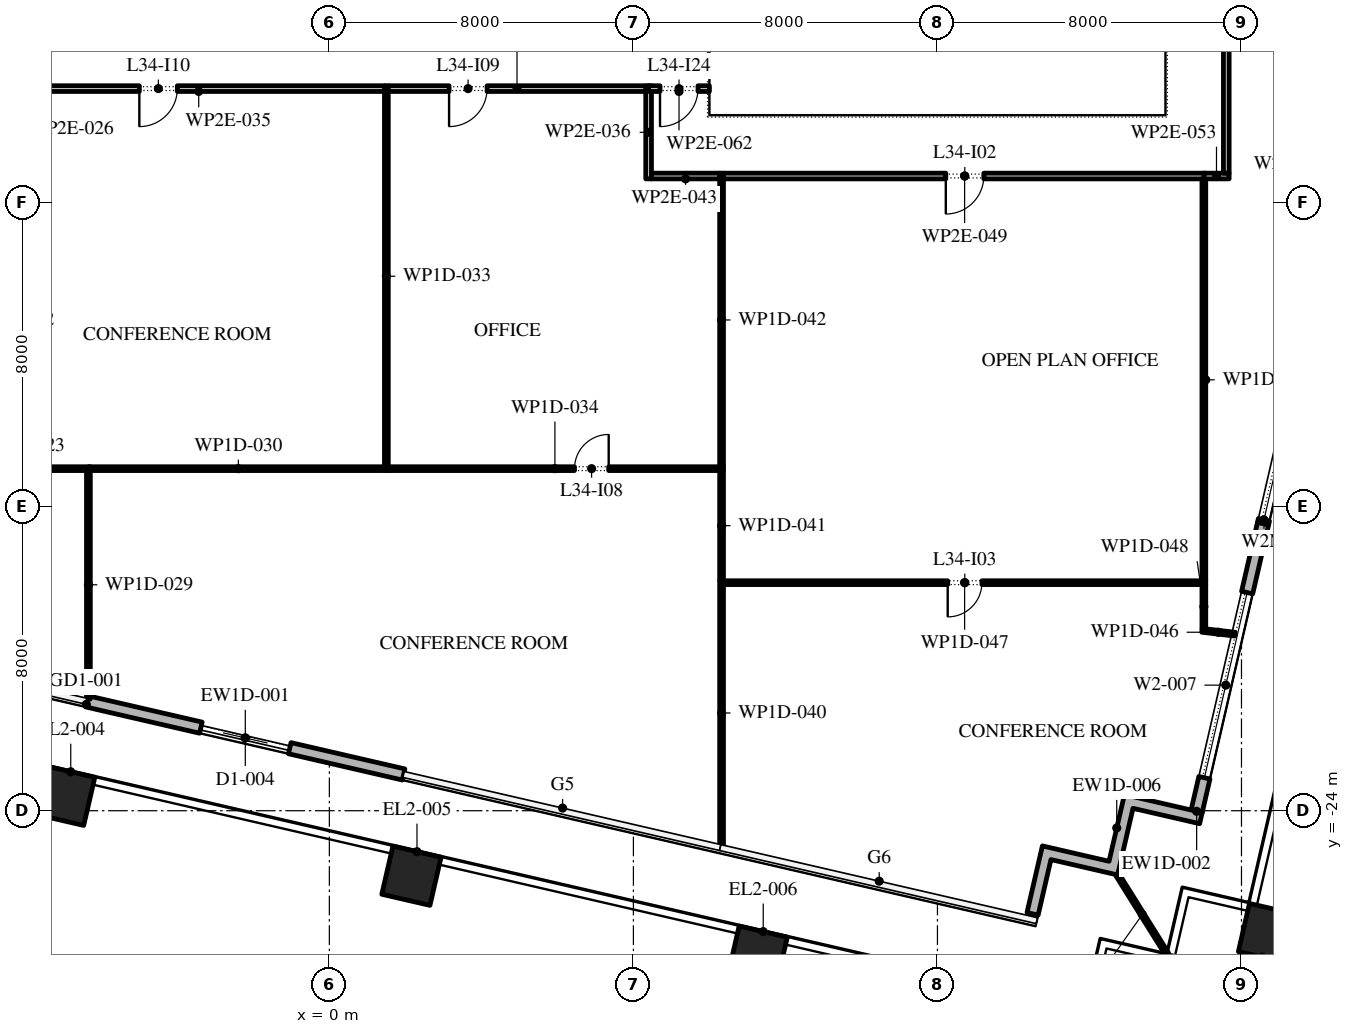
"""IFC4 building model, lengths in metres.
Left out: names, types, materials, properties, quantities, classifications, styles, units other than length and angle.
Written with IfcOpenShell. Run it as: python <this file> out.ifc"""

import sys

from ifc_helpers import new_model, si_unit, direction, frame, frame_2d, origin, origin_2d, place, context, subcontext, project, spatial, polyline, rectangle, outline, extrude, element, fill, save


model = new_model("IFC4")
c1 = context("Model", 3, precision=1e-05, world=origin(), true_north=direction((0.0, 1.0)))
c2 = subcontext(c1, "Body", "Model", "MODEL_VIEW")
j1 = project(units=[si_unit("LENGTHUNIT", "METRE"), si_unit("PLANEANGLEUNIT", "RADIAN")], contexts=[c1])
p1 = place(None, origin())
s1 = spatial("IfcSite", under=j1, at=p1, CompositionType="ELEMENT")
p2 = place(p1, origin())
s2 = spatial("IfcBuilding", under=s1, at=p2, CompositionType="ELEMENT")
p3 = place(p2, frame((0.0, 0.0, 156.0)))
s3 = spatial("IfcBuildingStorey", under=s2, at=p3, CompositionType="ELEMENT", Elevation=156.0)
for number, where, z_axis, x_axis in (
    (1, (-6.951, -23.608, 0.0), (0.0, 0.0, 1.0), (0.974, -0.225, 0.0)),
    (2, (2.159, -25.711, 0.0), (0.0, 0.0, 1.0), (0.974, -0.225, 0.0)),
    (3, (11.27, -27.815, 0.0), (0.0, 0.0, 1.0), (0.974, -0.225, 0.0)),
    (4, (24.698, -27.22, 0.0), (0.0, 0.0, 1.0), (0.974, -0.225, 0.0)),
    (5, (22.539, -28.569, 0.0), (0.0, 0.0, 1.0), (0.974, -0.225, 0.0)),
):
    element("IfcColumn", number, at=place(p3, frame(where, z_axis=z_axis, x_axis=x_axis)), inside=s3, PredefinedType="COLUMN", context=c2, shape_type="SweptSolid", body=[
        extrude(rectangle(XDim=1.3, YDim=1.3, at=origin_2d()), origin(), (0.0, 0.0, 1.0), 4.2),
    ])
p4 = place(p3, frame((-6.377, -21.123, 0.0), z_axis=(0.0, 0.0, 1.0), x_axis=(0.974370979495, -0.224947092265, 0.0)))
e6 = element("IfcWall", 6, at=p4, inside=s3, PredefinedType="STANDARD", context=c2, shape_type="SweptSolid", body=[
    extrude(rectangle(XDim=8.55, YDim=0.3, at=frame_2d((4.275, 0.0))), origin(), (0.0, 0.0, 1.0), 3.9),
])
p5 = place(p4, frame((3.075, 0.0, 0.0)))
e7 = element("IfcOpeningElement", 7, at=p5, cuts=e6, PredefinedType="OPENING", context=c2, shape_type="SweptSolid", body=[
    extrude(rectangle(XDim=2.4, YDim=3.5, at=frame_2d((1.2, 1.75))), frame((0.0, 0.16, 0.0), z_axis=(0.0, -1.0, 0.0), x_axis=(1.0, 0.0, 0.0)), (0.0, 0.0, 1.0), 0.32),
])
p6 = place(p3, frame((22.82, -24.016, 0.0), z_axis=(0.0, 0.0, 1.0), x_axis=(0.224962751334, 0.974367364248, 0.0)))
e8 = element("IfcWall", 8, at=p6, inside=s3, PredefinedType="STANDARD", context=c2, shape_type="SweptSolid", body=[
    extrude(rectangle(XDim=7.771, YDim=0.3, at=frame_2d((3.886, 0.0))), origin(), (0.0, 0.0, 1.0), 3.9),
])
p7 = place(p6, frame((0.907, 0.0, 0.45)))
e9 = element("IfcOpeningElement", 9, at=p7, cuts=e8, PredefinedType="OPENING", context=c2, shape_type="SweptSolid", body=[
    extrude(rectangle(XDim=5.0, YDim=3.25, at=frame_2d((2.5, 1.625))), frame((0.0, 0.16, 0.0), z_axis=(0.0, -1.0, 0.0), x_axis=(1.0, 0.0, 0.0)), (0.0, 0.0, 1.0), 0.32),
])
p8 = place(p3, origin())
e10 = element("IfcWall", 10, at=p8, inside=s3, PredefinedType="STANDARD", context=c2, shape_type="SweptSolid", body=[
    extrude(outline(polyline([(20.515, -25.331), (20.92, -23.577), (22.967, -24.049), (22.899, -24.342), (21.145, -23.937), (20.74, -25.691), (18.986, -25.286), (18.649, -26.747), (18.357, -26.68), (18.762, -24.926), (20.515, -25.331)])), origin(), (0.0, 0.0, 1.0), 3.9),
])
p9 = place(p3, frame((20.74, -25.691, -0.05), z_axis=(0.0, 0.0, 1.0), x_axis=(0.529972121605, -0.848015064914, 0.0)))
e11 = element("IfcWall", 11, at=p9, inside=s3, PredefinedType="STANDARD", context=c2, shape_type="SweptSolid", body=[
    extrude(rectangle(XDim=2.455, YDim=0.1, at=frame_2d((1.228, 0.0))), origin(), (0.0, 0.0, 1.0), 3.95),
])
p10 = place(p3, frame((-9.95, -15.0, 0.0), z_axis=(0.0, 0.0, 1.0), x_axis=(1.0, 0.0, 0.0)))
e12 = element("IfcWall", 12, at=p10, inside=s3, PredefinedType="PARTITIONING", context=c2, shape_type="SweptSolid", body=[
    extrude(rectangle(XDim=3.66, YDim=0.1, at=frame_2d((1.83, 0.0))), origin(), (0.0, 0.0, 1.0), 3.9),
])
p11 = place(p3, frame((-6.34, -15.05, 0.0), z_axis=(0.0, 0.0, 1.0), x_axis=(0.0, -1.0, 0.0)))
e13 = element("IfcWall", 13, at=p11, inside=s3, PredefinedType="PARTITIONING", context=c2, shape_type="SweptSolid", body=[
    extrude(rectangle(XDim=6.011, YDim=0.1, at=frame_2d((3.005, 0.0))), origin(), (0.0, 0.0, 1.0), 3.9),
])
p12 = place(p3, frame((-6.34, -15.0, 0.0), z_axis=(0.0, 0.0, 1.0), x_axis=(1.0, 0.0, 0.0)))
e14 = element("IfcWall", 14, at=p12, inside=s3, PredefinedType="PARTITIONING", context=c2, shape_type="SweptSolid", body=[
    extrude(rectangle(XDim=7.89, YDim=0.1, at=frame_2d((3.945, 0.0))), origin(), (0.0, 0.0, 1.0), 3.9),
])
p13 = place(p3, frame((1.5, -14.95, 0.0), z_axis=(0.0, 0.0, 1.0), x_axis=(0.0, 1.0, 0.0)))
e15 = element("IfcWall", 15, at=p13, inside=s3, PredefinedType="PARTITIONING", context=c2, shape_type="SweptSolid", body=[
    extrude(rectangle(XDim=10.025, YDim=0.1, at=frame_2d((5.012, 0.0))), origin(), (0.0, 0.0, 1.0), 3.9),
])
p14 = place(p3, frame((1.5, -15.0, 0.0), z_axis=(0.0, 0.0, 1.0), x_axis=(1.0, 0.0, 0.0)))
e16 = element("IfcWall", 16, at=p14, inside=s3, PredefinedType="PARTITIONING", context=c2, shape_type="SweptSolid", body=[
    extrude(rectangle(XDim=8.87, YDim=0.1, at=frame_2d((4.435, 0.0))), origin(), (0.0, 0.0, 1.0), 3.9),
])
p15 = place(p14, frame((4.95, 0.0, 0.0)))
e17 = element("IfcOpeningElement", 17, at=p15, cuts=e16, PredefinedType="OPENING", context=c2, shape_type="SweptSolid", body=[
    extrude(rectangle(XDim=0.9, YDim=2.1, at=frame_2d((0.45, 1.05))), frame((0.0, 0.06, 0.0), z_axis=(0.0, -1.0, 0.0), x_axis=(1.0, 0.0, 0.0)), (0.0, 0.0, 1.0), 0.12),
])
p16 = place(p3, frame((1.45, -5.0, 0.0), z_axis=(0.0, 0.0, 1.0), x_axis=(-1.0, 0.0, 0.0)))
e18 = element("IfcWall", 18, at=p16, inside=s3, PredefinedType="PARTITIONING", context=c2, shape_type="SweptSolid", body=[
    extrude(rectangle(XDim=9.775, YDim=0.15, at=frame_2d((4.887, 0.0))), origin(), (0.0, 0.0, 1.0), 3.9),
])
p17 = place(p16, frame((5.45, 0.0, 0.0)))
e19 = element("IfcOpeningElement", 19, at=p17, cuts=e18, PredefinedType="OPENING", context=c2, shape_type="SweptSolid", body=[
    extrude(rectangle(XDim=1.0, YDim=2.1, at=frame_2d((0.5, 1.05))), frame((0.0, 0.085, 0.0), z_axis=(0.0, -1.0, 0.0), x_axis=(1.0, 0.0, 0.0)), (0.0, 0.0, 1.0), 0.17),
])
p18 = place(p3, frame((8.4, -7.375, 0.0), z_axis=(0.0, 0.0, 1.0), x_axis=(0.0, 1.0, 0.0)))
e20 = element("IfcWall", 20, at=p18, inside=s3, PredefinedType="PARTITIONING", context=c2, shape_type="SweptSolid", body=[
    extrude(rectangle(XDim=2.45, YDim=0.15, at=frame_2d((1.225, 0.0))), origin(), (0.0, 0.0, 1.0), 3.9),
])
p19 = place(p3, frame((8.325, -5.0, 0.0), z_axis=(0.0, 0.0, 1.0), x_axis=(-1.0, 0.0, 0.0)))
e21 = element("IfcWall", 21, at=p19, inside=s3, PredefinedType="PARTITIONING", context=c2, shape_type="SweptSolid", body=[
    extrude(rectangle(XDim=6.775, YDim=0.15, at=frame_2d((3.387, 0.0))), origin(), (0.0, 0.0, 1.0), 3.9),
])
p20 = place(p19, frame((4.175, 0.0, 0.0)))
e22 = element("IfcOpeningElement", 22, at=p20, cuts=e21, PredefinedType="OPENING", context=c2, shape_type="SweptSolid", body=[
    extrude(rectangle(XDim=1.0, YDim=2.1, at=frame_2d((0.5, 1.05))), frame((0.0, 0.085, 0.0), z_axis=(0.0, -1.0, 0.0), x_axis=(1.0, 0.0, 0.0)), (0.0, 0.0, 1.0), 0.17),
])
p21 = place(p3, frame((10.32, -24.907, 0.0), z_axis=(0.0, 0.0, 1.0), x_axis=(0.0, 1.0, 0.0)))
e23 = element("IfcWall", 23, at=p21, inside=s3, PredefinedType="PARTITIONING", context=c2, shape_type="SweptSolid", body=[
    extrude(rectangle(XDim=6.957, YDim=0.1, at=frame_2d((3.479, 0.0))), origin(), (0.0, 0.0, 1.0), 3.9),
])
p22 = place(p3, frame((10.32, -17.95, 0.0), z_axis=(0.0, 0.0, 1.0), x_axis=(0.0, 1.0, 0.0)))
e24 = element("IfcWall", 24, at=p22, inside=s3, PredefinedType="PARTITIONING", context=c2, shape_type="SweptSolid", body=[
    extrude(rectangle(XDim=2.9, YDim=0.1, at=frame_2d((1.45, 0.0))), origin(), (0.0, 0.0, 1.0), 3.9),
])
p23 = place(p3, frame((10.32, -14.95, 0.0), z_axis=(0.0, 0.0, 1.0), x_axis=(0.0, 1.0, 0.0)))
e25 = element("IfcWall", 25, at=p23, inside=s3, PredefinedType="PARTITIONING", context=c2, shape_type="SweptSolid", body=[
    extrude(rectangle(XDim=7.725, YDim=0.1, at=frame_2d((3.862, 0.0))), origin(), (0.0, 0.0, 1.0), 3.9),
])
p24 = place(p3, frame((10.27, -7.3, 0.0), z_axis=(0.0, 0.0, 1.0), x_axis=(-1.0, 0.0, 0.0)))
e26 = element("IfcWall", 26, at=p24, inside=s3, PredefinedType="PARTITIONING", context=c2, shape_type="SweptSolid", body=[
    extrude(rectangle(XDim=1.795, YDim=0.15, at=frame_2d((0.897, 0.0))), origin(), (0.0, 0.0, 1.0), 3.9),
])
p25 = place(p3, frame((22.96, -19.254, 0.0), z_axis=(0.0, 0.0, 1.0), x_axis=(0.993370815498, -0.114954003487, 0.0)))
e27 = element("IfcWall", 27, at=p25, inside=s3, PredefinedType="PARTITIONING", context=c2, shape_type="SweptSolid", body=[
    extrude(rectangle(XDim=0.871, YDim=0.1, at=frame_2d((0.436, 0.0))), origin(), (0.0, 0.0, 1.0), 3.9),
])
p26 = place(p3, frame((23.06, -18.0, 0.0), z_axis=(0.0, 0.0, 1.0), x_axis=(-1.0, 0.0, 0.0)))
e28 = element("IfcWall", 28, at=p26, inside=s3, PredefinedType="PARTITIONING", context=c2, shape_type="SweptSolid", body=[
    extrude(rectangle(XDim=12.69, YDim=0.1, at=frame_2d((6.345, 0.0))), origin(), (0.0, 0.0, 1.0), 3.9),
])
p27 = place(p26, frame((5.89, 0.0, 0.0)))
e29 = element("IfcOpeningElement", 29, at=p27, cuts=e28, PredefinedType="OPENING", context=c2, shape_type="SweptSolid", body=[
    extrude(rectangle(XDim=0.9, YDim=2.1, at=frame_2d((0.45, 1.05))), frame((0.0, 0.06, 0.0), z_axis=(0.0, -1.0, 0.0), x_axis=(1.0, 0.0, 0.0)), (0.0, 0.0, 1.0), 0.12),
])
p28 = place(p3, frame((23.01, -18.05, 0.0), z_axis=(0.0, 0.0, 1.0), x_axis=(0.0, -1.0, 0.0)))
e30 = element("IfcWall", 30, at=p28, inside=s3, PredefinedType="PARTITIONING", context=c2, shape_type="SweptSolid", body=[
    extrude(rectangle(XDim=1.16, YDim=0.1, at=frame_2d((0.58, 0.0))), origin(), (0.0, 0.0, 1.0), 3.9),
])
p29 = place(p3, frame((23.06, -7.3, 0.0), z_axis=(0.0, 0.0, 1.0), x_axis=(-1.0, 0.0, 0.0)))
e31 = element("IfcWall", 31, at=p29, inside=s3, PredefinedType="PARTITIONING", context=c2, shape_type="SweptSolid", body=[
    extrude(rectangle(XDim=12.69, YDim=0.15, at=frame_2d((6.345, 0.0))), origin(), (0.0, 0.0, 1.0), 3.9),
])
p30 = place(p29, frame((5.84, 0.0, 0.0)))
e32 = element("IfcOpeningElement", 32, at=p30, cuts=e31, PredefinedType="OPENING", context=c2, shape_type="SweptSolid", body=[
    extrude(rectangle(XDim=1.0, YDim=2.1, at=frame_2d((0.5, 1.05))), frame((0.0, 0.085, 0.0), z_axis=(0.0, -1.0, 0.0), x_axis=(1.0, 0.0, 0.0)), (0.0, 0.0, 1.0), 0.17),
])
p31 = place(p3, frame((23.01, -7.375, 0.0), z_axis=(0.0, 0.0, 1.0), x_axis=(0.0, -1.0, 0.0)))
e33 = element("IfcWall", 33, at=p31, inside=s3, PredefinedType="PARTITIONING", context=c2, shape_type="SweptSolid", body=[
    extrude(rectangle(XDim=10.575, YDim=0.1, at=frame_2d((5.288, 0.0))), origin(), (0.0, 0.0, 1.0), 3.9),
])
p32 = place(p3, frame((23.675, -7.3, 0.0), z_axis=(0.0, 0.0, 1.0), x_axis=(-1.0, 0.0, 0.0)))
e34 = element("IfcWall", 34, at=p32, inside=s3, PredefinedType="PARTITIONING", context=c2, shape_type="SweptSolid", body=[
    extrude(rectangle(XDim=0.665, YDim=0.15, at=frame_2d((0.333, 0.0))), origin(), (0.0, 0.0, 1.0), 3.9),
])
p33 = place(p3, frame((23.6, 10.44, 0.0), z_axis=(0.0, 0.0, 1.0), x_axis=(0.0, -1.0, 0.0)))
e35 = element("IfcWall", 35, at=p33, inside=s3, PredefinedType="PARTITIONING", context=c2, shape_type="SweptSolid", body=[
    extrude(rectangle(XDim=17.665, YDim=0.15, at=frame_2d((8.833, 0.0))), origin(), (0.0, 0.0, 1.0), 3.9),
])
p34 = place(p33, frame((6.59, 0.0, 0.0)))
e36 = element("IfcOpeningElement", 36, at=p34, cuts=e35, PredefinedType="OPENING", context=c2, shape_type="SweptSolid", body=[
    extrude(rectangle(XDim=1.0, YDim=2.1, at=frame_2d((0.5, 1.05))), frame((0.0, 0.085, 0.0), z_axis=(0.0, -1.0, 0.0), x_axis=(1.0, 0.0, 0.0)), (0.0, 0.0, 1.0), 0.17),
])
p35 = place(p3, frame((10.0, -5.0, 0.0), z_axis=(0.0, 0.0, 1.0), x_axis=(-1.0, 0.0, 0.0)))
e37 = element("IfcWall", 37, at=p35, inside=s3, PredefinedType="PARTITIONING", context=c2, shape_type="SweptSolid", body=[
    extrude(rectangle(XDim=1.6, YDim=0.15, at=frame_2d((0.8, 0.0))), origin(), (0.0, 0.0, 1.0), 3.9),
])
p36 = place(p35, frame((0.3, 0.0, 0.0)))
e38 = element("IfcOpeningElement", 38, at=p36, cuts=e37, PredefinedType="OPENING", context=c2, shape_type="SweptSolid", body=[
    extrude(rectangle(XDim=1.0, YDim=2.1, at=frame_2d((0.5, 1.05))), frame((0.0, 0.085, 0.0), z_axis=(0.0, -1.0, 0.0), x_axis=(1.0, 0.0, 0.0)), (0.0, 0.0, 1.0), 0.17),
])
p37 = place(p3, frame((24.569, -16.443, 0.0), z_axis=(0.0, 0.0, 1.0), x_axis=(0.224941801871, 0.974372200841, 0.0)))
e39 = element("IfcWall", 39, at=p37, inside=s3, PredefinedType="STANDARD", context=c2, shape_type="SweptSolid", body=[
    extrude(rectangle(XDim=5.2, YDim=0.3, at=frame_2d((2.6, 0.0))), origin(), (0.0, 0.0, 1.0), 2.93),
])
p38 = place(p37, frame((0.1, 0.0, 0.45)))
e40 = element("IfcOpeningElement", 40, at=p38, cuts=e39, PredefinedType="OPENING", context=c2, shape_type="SweptSolid", body=[
    extrude(rectangle(XDim=5.0, YDim=2.35, at=frame_2d((2.5, 1.175))), frame((0.0, 0.16, 0.0), z_axis=(0.0, -1.0, 0.0), x_axis=(1.0, 0.0, 0.0)), (0.0, 0.0, 1.0), 0.32),
])
p39 = place(p5, origin())
e41 = element("IfcDoor", 41, at=p39, inside=s3, OperationType="DOUBLE_DOOR_SLIDING", PredefinedType="DOOR", context=c2, shape_type="SweptSolid", body=[
    extrude(rectangle(XDim=2.4, YDim=3.5, at=frame_2d((1.2, 1.75))), frame((0.0, 0.025, 0.0), z_axis=(0.0, -1.0, 0.0), x_axis=(1.0, 0.0, 0.0)), (0.0, 0.0, 1.0), 0.05),
])
fill(e7, e41)
p40 = place(p7, origin())
e42 = element("IfcWindow", 42, at=p40, inside=s3, PartitioningType="DOUBLE_PANEL_VERTICAL", PredefinedType="WINDOW", context=c2, shape_type="SweptSolid", body=[
    extrude(rectangle(XDim=5.0, YDim=3.25, at=frame_2d((2.5, 1.625))), frame((0.0, 0.03, 0.0), z_axis=(0.0, -1.0, 0.0), x_axis=(1.0, 0.0, 0.0)), (0.0, 0.0, 1.0), 0.06),
])
fill(e9, e42)
p41 = place(p38, origin())
e43 = element("IfcWindow", 43, at=p41, inside=s3, PartitioningType="DOUBLE_PANEL_VERTICAL", PredefinedType="WINDOW", context=c2, shape_type="SweptSolid", body=[
    extrude(rectangle(XDim=5.0, YDim=2.35, at=frame_2d((2.5, 1.175))), frame((0.0, 0.03, 0.0), z_axis=(0.0, -1.0, 0.0), x_axis=(1.0, 0.0, 0.0)), (0.0, 0.0, 1.0), 0.06),
])
fill(e40, e43)
p42 = place(p30, origin())
e44 = element("IfcDoor", 44, at=p42, inside=s3, OperationType="SINGLE_SWING_LEFT", PredefinedType="DOOR", context=c2, shape_type="SweptSolid", body=[
    extrude(rectangle(XDim=1.0, YDim=2.1, at=frame_2d((0.5, 1.05))), frame((0.0, 0.025, 0.0), z_axis=(0.0, -1.0, 0.0), x_axis=(1.0, 0.0, 0.0)), (0.0, 0.0, 1.0), 0.05),
])
fill(e32, e44)
p43 = place(p27, origin())
e45 = element("IfcDoor", 45, at=p43, inside=s3, OperationType="SINGLE_SWING_LEFT", PredefinedType="DOOR", context=c2, shape_type="SweptSolid", body=[
    extrude(rectangle(XDim=0.9, YDim=2.1, at=frame_2d((0.45, 1.05))), frame((0.0, 0.025, 0.0), z_axis=(0.0, -1.0, 0.0), x_axis=(1.0, 0.0, 0.0)), (0.0, 0.0, 1.0), 0.05),
])
fill(e29, e45)
p44 = place(p15, origin())
e46 = element("IfcDoor", 46, at=p44, inside=s3, OperationType="SINGLE_SWING_LEFT", PredefinedType="DOOR", context=c2, shape_type="SweptSolid", body=[
    extrude(rectangle(XDim=0.9, YDim=2.1, at=frame_2d((0.45, 1.05))), frame((0.0, 0.025, 0.0), z_axis=(0.0, -1.0, 0.0), x_axis=(1.0, 0.0, 0.0)), (0.0, 0.0, 1.0), 0.05),
])
fill(e17, e46)
p45 = place(p20, origin())
e47 = element("IfcDoor", 47, at=p45, inside=s3, OperationType="SINGLE_SWING_LEFT", PredefinedType="DOOR", context=c2, shape_type="SweptSolid", body=[
    extrude(rectangle(XDim=1.0, YDim=2.1, at=frame_2d((0.5, 1.05))), frame((0.0, 0.025, 0.0), z_axis=(0.0, -1.0, 0.0), x_axis=(1.0, 0.0, 0.0)), (0.0, 0.0, 1.0), 0.05),
])
fill(e22, e47)
p46 = place(p17, origin())
e48 = element("IfcDoor", 48, at=p46, inside=s3, OperationType="SINGLE_SWING_LEFT", PredefinedType="DOOR", context=c2, shape_type="SweptSolid", body=[
    extrude(rectangle(XDim=1.0, YDim=2.1, at=frame_2d((0.5, 1.05))), frame((0.0, 0.025, 0.0), z_axis=(0.0, -1.0, 0.0), x_axis=(1.0, 0.0, 0.0)), (0.0, 0.0, 1.0), 0.05),
])
fill(e19, e48)
p47 = place(p36, origin())
e49 = element("IfcDoor", 49, at=p47, inside=s3, OperationType="SINGLE_SWING_LEFT", PredefinedType="DOOR", context=c2, shape_type="SweptSolid", body=[
    extrude(rectangle(XDim=1.0, YDim=2.1, at=frame_2d((0.5, 1.05))), frame((0.0, 0.025, 0.0), z_axis=(0.0, -1.0, 0.0), x_axis=(1.0, 0.0, 0.0)), (0.0, 0.0, 1.0), 0.05),
])
fill(e38, e49)
save(model, sys.argv[1])
